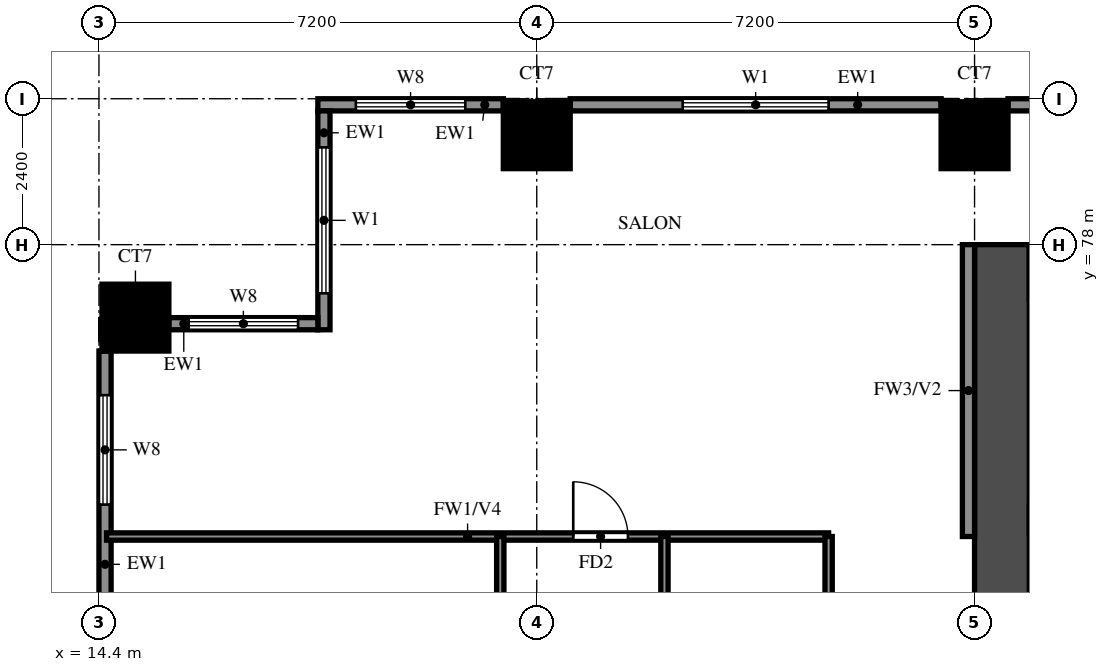
"""IFC4 building model, lengths in metres.
Left out: names, types, materials, properties, quantities, classifications, styles, units other than length and angle.
Written with IfcOpenShell. Run it as: python <this file> out.ifc"""

import sys

from ifc_helpers import new_model, si_unit, direction, frame, frame_2d, origin, origin_2d, place, context, subcontext, project, spatial, rectangle, extrude, source, transform, mapped, element, fill, save


model = new_model("IFC4")
c1 = context("Model", 3, precision=1e-05, world=origin(), true_north=direction((0.0, 1.0)))
c2 = subcontext(c1, "Body", "Model", "MODEL_VIEW")
j1 = project(units=[si_unit("LENGTHUNIT", "METRE"), si_unit("PLANEANGLEUNIT", "RADIAN")], contexts=[c1])
p1 = place(None, origin())
s1 = spatial("IfcSite", under=j1, at=p1, CompositionType="ELEMENT")
p2 = place(p1, origin())
s2 = spatial("IfcBuilding", under=s1, at=p2, CompositionType="ELEMENT")
p3 = place(p2, frame((0.0, 0.0, 41.0)))
s3 = spatial("IfcBuildingStorey", under=s2, at=p3, CompositionType="ELEMENT", Elevation=41.0)
m1 = source(origin(), c2, "Body", "SweptSolid", [
    extrude(rectangle(XDim=1.1, YDim=1.1, at=origin_2d()), origin(), (0.0, 0.0, 1.0), 3.18),
])
for number, where, z_axis, x_axis in (
    (1, (15.0, 76.8, 0.0), (0.0, 0.0, 1.0), (1.0, 0.0, 0.0)),
    (2, (21.6, 79.8, 0.0), (0.0, 0.0, 1.0), (1.0, 0.0, 0.0)),
    (3, (28.8, 79.8, 0.0), (0.0, 0.0, 1.0), (1.0, 0.0, 0.0)),
):
    element("IfcColumn", number, at=place(p3, frame(where, z_axis=z_axis, x_axis=x_axis)), inside=s3, PredefinedType="COLUMN", context=c2, shape_type="MappedRepresentation", body=[
        mapped(m1, transform((0.0, 0.0, 0.0))),
    ])
p4 = place(p3, frame((29.25, 66.0, 0.0), z_axis=(0.0, 0.0, 1.0), x_axis=(0.0, 1.0, 0.0)))
e4 = element("IfcWall", 4, at=p4, inside=s3, PredefinedType="SHEAR", context=c2, shape_type="SweptSolid", body=[
    extrude(rectangle(XDim=12.0, YDim=0.9, at=frame_2d((6.0, 0.0))), origin(), (0.0, 0.0, 1.0), 3.18),
])
p5 = place(p3, frame((29.7, 73.475, 0.0), z_axis=(0.0, 0.0, 1.0), x_axis=(1.0, 0.0, 0.0)))
e5 = element("IfcWall", 5, at=p5, inside=s3, PredefinedType="SHEAR", context=c2, shape_type="SweptSolid", body=[
    extrude(rectangle(XDim=3.175, YDim=0.45, at=frame_2d((1.587, 0.0))), origin(), (0.0, 0.0, 1.0), 3.18),
])
p6 = place(p3, frame((35.45, 80.3, 0.0), z_axis=(0.0, 0.0, 1.0), x_axis=(-1.0, 0.0, 0.0)))
e6 = element("IfcWall", 6, at=p6, inside=s3, PredefinedType="SOLIDWALL", context=c2, shape_type="SweptSolid", body=[
    extrude(rectangle(XDim=6.1, YDim=0.2, at=frame_2d((3.05, 0.0))), origin(), (0.0, 0.0, 1.0), 3.18),
])
p7 = place(p3, frame((28.25, 80.3, 0.0), z_axis=(0.0, 0.0, 1.0), x_axis=(-1.0, 0.0, 0.0)))
e7 = element("IfcWall", 7, at=p7, inside=s3, PredefinedType="SOLIDWALL", context=c2, shape_type="SweptSolid", body=[
    extrude(rectangle(XDim=6.1, YDim=0.2, at=frame_2d((3.05, 0.0))), origin(), (0.0, 0.0, 1.0), 3.18),
])
p8 = place(p7, frame((1.85, 0.0, 0.6)))
e8 = element("IfcOpeningElement", 8, at=p8, cuts=e7, PredefinedType="OPENING", context=c2, shape_type="SweptSolid", body=[
    extrude(rectangle(XDim=2.4, YDim=2.4, at=frame_2d((1.2, 1.2))), frame((0.0, 0.11, 0.0), z_axis=(0.0, -1.0, 0.0), x_axis=(1.0, 0.0, 0.0)), (0.0, 0.0, 1.0), 0.22),
])
p9 = place(p3, frame((21.05, 80.3, 0.0), z_axis=(0.0, 0.0, 1.0), x_axis=(-1.0, 0.0, 0.0)))
e9 = element("IfcWall", 9, at=p9, inside=s3, PredefinedType="SOLIDWALL", context=c2, shape_type="SweptSolid", body=[
    extrude(rectangle(XDim=3.05, YDim=0.2, at=frame_2d((1.525, 0.0))), origin(), (0.0, 0.0, 1.0), 3.18),
])
p10 = place(p9, frame((0.625, 0.0, 0.6)))
e10 = element("IfcOpeningElement", 10, at=p10, cuts=e9, PredefinedType="OPENING", context=c2, shape_type="SweptSolid", body=[
    extrude(rectangle(XDim=1.8, YDim=2.4, at=frame_2d((0.9, 1.2))), frame((0.0, 0.11, 0.0), z_axis=(0.0, -1.0, 0.0), x_axis=(1.0, 0.0, 0.0)), (0.0, 0.0, 1.0), 0.22),
])
p11 = place(p3, frame((18.1, 80.2, 0.0), z_axis=(0.0, 0.0, 1.0), x_axis=(0.0, -1.0, 0.0)))
e11 = element("IfcWall", 11, at=p11, inside=s3, PredefinedType="SOLIDWALL", context=c2, shape_type="SweptSolid", body=[
    extrude(rectangle(XDim=3.6, YDim=0.2, at=frame_2d((1.8, 0.0))), origin(), (0.0, 0.0, 1.0), 3.18),
])
p12 = place(p11, frame((0.6, 0.0, 0.6)))
e12 = element("IfcOpeningElement", 12, at=p12, cuts=e11, PredefinedType="OPENING", context=c2, shape_type="SweptSolid", body=[
    extrude(rectangle(XDim=2.4, YDim=2.4, at=frame_2d((1.2, 1.2))), frame((0.0, 0.11, 0.0), z_axis=(0.0, -1.0, 0.0), x_axis=(1.0, 0.0, 0.0)), (0.0, 0.0, 1.0), 0.22),
])
p13 = place(p3, frame((18.0, 76.7, 0.0), z_axis=(0.0, 0.0, 1.0), x_axis=(-1.0, 0.0, 0.0)))
e13 = element("IfcWall", 13, at=p13, inside=s3, PredefinedType="SOLIDWALL", context=c2, shape_type="SweptSolid", body=[
    extrude(rectangle(XDim=2.45, YDim=0.2, at=frame_2d((1.225, 0.0))), origin(), (0.0, 0.0, 1.0), 3.18),
])
p14 = place(p13, frame((0.325, 0.0, 0.6)))
e14 = element("IfcOpeningElement", 14, at=p14, cuts=e13, PredefinedType="OPENING", context=c2, shape_type="SweptSolid", body=[
    extrude(rectangle(XDim=1.8, YDim=2.4, at=frame_2d((0.9, 1.2))), frame((0.0, 0.11, 0.0), z_axis=(0.0, -1.0, 0.0), x_axis=(1.0, 0.0, 0.0)), (0.0, 0.0, 1.0), 0.22),
])
p15 = place(p3, frame((14.5, 76.25, 0.0), z_axis=(0.0, 0.0, 1.0), x_axis=(0.0, -1.0, 0.0)))
e15 = element("IfcWall", 15, at=p15, inside=s3, PredefinedType="SOLIDWALL", context=c2, shape_type="SweptSolid", body=[
    extrude(rectangle(XDim=6.1, YDim=0.2, at=frame_2d((3.05, 0.0))), origin(), (0.0, 0.0, 1.0), 3.18),
])
p16 = place(p15, frame((4.025, 0.0, 1.5)))
e16 = element("IfcOpeningElement", 16, at=p16, cuts=e15, PredefinedType="OPENING", context=c2, shape_type="SweptSolid", body=[
    extrude(rectangle(XDim=0.9, YDim=0.9, at=frame_2d((0.45, 0.45))), frame((0.0, 0.11, 0.0), z_axis=(0.0, -1.0, 0.0), x_axis=(1.0, 0.0, 0.0)), (0.0, 0.0, 1.0), 0.22),
])
p17 = place(p15, frame((0.725, 0.0, 0.6)))
e17 = element("IfcOpeningElement", 17, at=p17, cuts=e15, PredefinedType="OPENING", context=c2, shape_type="SweptSolid", body=[
    extrude(rectangle(XDim=1.8, YDim=2.4, at=frame_2d((0.9, 1.2))), frame((0.0, 0.11, 0.0), z_axis=(0.0, -1.0, 0.0), x_axis=(1.0, 0.0, 0.0)), (0.0, 0.0, 1.0), 0.22),
])
p18 = place(p3, frame((28.7, 73.2, 0.0), z_axis=(0.0, 0.0, 1.0), x_axis=(0.0, 1.0, 0.0)))
e18 = element("IfcWall", 18, at=p18, inside=s3, PredefinedType="SOLIDWALL", context=c2, shape_type="SweptSolid", body=[
    extrude(rectangle(XDim=4.8, YDim=0.2, at=frame_2d((2.4, 0.0))), origin(), (0.0, 0.0, 1.0), 3.18),
])
p19 = place(p3, frame((14.525, 73.2, 0.0), z_axis=(0.0, 0.0, 1.0), x_axis=(1.0, 0.0, 0.0)))
e19 = element("IfcWall", 19, at=p19, inside=s3, PredefinedType="PARTITIONING", context=c2, shape_type="SweptSolid", body=[
    extrude(rectangle(XDim=11.875, YDim=0.12, at=frame_2d((5.938, 0.0))), origin(), (0.0, 0.0, 1.0), 2.28),
])
p20 = place(p19, frame((7.675, 0.0, 0.0)))
e20 = element("IfcOpeningElement", 20, at=p20, cuts=e19, PredefinedType="OPENING", context=c2, shape_type="SweptSolid", body=[
    extrude(rectangle(XDim=0.9, YDim=2.1, at=frame_2d((0.45, 1.05))), frame((0.0, 0.07, 0.0), z_axis=(0.0, -1.0, 0.0), x_axis=(1.0, 0.0, 0.0)), (0.0, 0.0, 1.0), 0.14),
])
p21 = place(p3, frame((21.0, 69.6, 0.0), z_axis=(0.0, 0.0, 1.0), x_axis=(0.0, 1.0, 0.0)))
e21 = element("IfcWall", 21, at=p21, inside=s3, PredefinedType="PARTITIONING", context=c2, shape_type="SweptSolid", body=[
    extrude(rectangle(XDim=3.6, YDim=0.12, at=frame_2d((1.8, 0.0))), origin(), (0.0, 0.0, 1.0), 3.18),
])
p22 = place(p3, frame((23.7, 61.2, 0.0), z_axis=(0.0, 0.0, 1.0), x_axis=(0.0, 1.0, 0.0)))
e22 = element("IfcWall", 22, at=p22, inside=s3, PredefinedType="PARTITIONING", context=c2, shape_type="SweptSolid", body=[
    extrude(rectangle(XDim=12.0, YDim=0.12, at=frame_2d((6.0, 0.0))), origin(), (0.0, 0.0, 1.0), 3.18),
])
p23 = place(p22, frame((4.55, 0.0, 0.0)))
e23 = element("IfcOpeningElement", 23, at=p23, cuts=e22, PredefinedType="OPENING", context=c2, shape_type="SweptSolid", body=[
    extrude(rectangle(XDim=0.9, YDim=2.1, at=frame_2d((0.45, 1.05))), frame((0.0, 0.07, 0.0), z_axis=(0.0, -1.0, 0.0), x_axis=(1.0, 0.0, 0.0)), (0.0, 0.0, 1.0), 0.14),
])
p24 = place(p22, frame((9.3, 0.0, 0.0)))
e24 = element("IfcOpeningElement", 24, at=p24, cuts=e22, PredefinedType="OPENING", context=c2, shape_type="SweptSolid", body=[
    extrude(rectangle(XDim=0.8, YDim=2.1, at=frame_2d((0.4, 1.05))), frame((0.0, 0.07, 0.0), z_axis=(0.0, -1.0, 0.0), x_axis=(1.0, 0.0, 0.0)), (0.0, 0.0, 1.0), 0.14),
])
p25 = place(p3, frame((26.4, 68.6, 0.0), z_axis=(0.0, 0.0, 1.0), x_axis=(0.0, 1.0, 0.0)))
e25 = element("IfcWall", 25, at=p25, inside=s3, PredefinedType="PARTITIONING", context=c2, shape_type="SweptSolid", body=[
    extrude(rectangle(XDim=4.6, YDim=0.12, at=frame_2d((2.3, 0.0))), origin(), (0.0, 0.0, 1.0), 3.18),
])
p26 = place(p8, origin())
e26 = element("IfcWindow", 26, at=p26, inside=s3, PartitioningType="DOUBLE_PANEL_VERTICAL", PredefinedType="WINDOW", context=c2, shape_type="SweptSolid", body=[
    extrude(rectangle(XDim=2.4, YDim=2.4, at=frame_2d((1.2, 1.2))), frame((0.0, 0.03, 0.0), z_axis=(0.0, -1.0, 0.0), x_axis=(1.0, 0.0, 0.0)), (0.0, 0.0, 1.0), 0.06),
])
fill(e8, e26)
p27 = place(p10, origin())
e27 = element("IfcWindow", 27, at=p27, inside=s3, PartitioningType="DOUBLE_PANEL_VERTICAL", PredefinedType="WINDOW", context=c2, shape_type="SweptSolid", body=[
    extrude(rectangle(XDim=1.8, YDim=2.4, at=frame_2d((0.9, 1.2))), frame((0.0, 0.03, 0.0), z_axis=(0.0, -1.0, 0.0), x_axis=(1.0, 0.0, 0.0)), (0.0, 0.0, 1.0), 0.06),
])
fill(e10, e27)
p28 = place(p12, origin())
e28 = element("IfcWindow", 28, at=p28, inside=s3, PartitioningType="DOUBLE_PANEL_VERTICAL", PredefinedType="WINDOW", context=c2, shape_type="SweptSolid", body=[
    extrude(rectangle(XDim=2.4, YDim=2.4, at=frame_2d((1.2, 1.2))), frame((0.0, 0.03, 0.0), z_axis=(0.0, -1.0, 0.0), x_axis=(1.0, 0.0, 0.0)), (0.0, 0.0, 1.0), 0.06),
])
fill(e12, e28)
p29 = place(p14, origin())
e29 = element("IfcWindow", 29, at=p29, inside=s3, PartitioningType="DOUBLE_PANEL_VERTICAL", PredefinedType="WINDOW", context=c2, shape_type="SweptSolid", body=[
    extrude(rectangle(XDim=1.8, YDim=2.4, at=frame_2d((0.9, 1.2))), frame((0.0, 0.03, 0.0), z_axis=(0.0, -1.0, 0.0), x_axis=(1.0, 0.0, 0.0)), (0.0, 0.0, 1.0), 0.06),
])
fill(e14, e29)
p30 = place(p17, origin())
e30 = element("IfcWindow", 30, at=p30, inside=s3, PartitioningType="DOUBLE_PANEL_VERTICAL", PredefinedType="WINDOW", context=c2, shape_type="SweptSolid", body=[
    extrude(rectangle(XDim=1.8, YDim=2.4, at=frame_2d((0.9, 1.2))), frame((0.0, 0.03, 0.0), z_axis=(0.0, -1.0, 0.0), x_axis=(1.0, 0.0, 0.0)), (0.0, 0.0, 1.0), 0.06),
])
fill(e17, e30)
p31 = place(p20, origin())
e31 = element("IfcDoor", 31, at=p31, inside=s3, OperationType="SINGLE_SWING_RIGHT", PredefinedType="DOOR", context=c2, shape_type="SweptSolid", body=[
    extrude(rectangle(XDim=0.9, YDim=2.1, at=frame_2d((0.45, 1.05))), frame((0.0, 0.025, 0.0), z_axis=(0.0, -1.0, 0.0), x_axis=(1.0, 0.0, 0.0)), (0.0, 0.0, 1.0), 0.05),
])
fill(e20, e31)
save(model, sys.argv[1])
